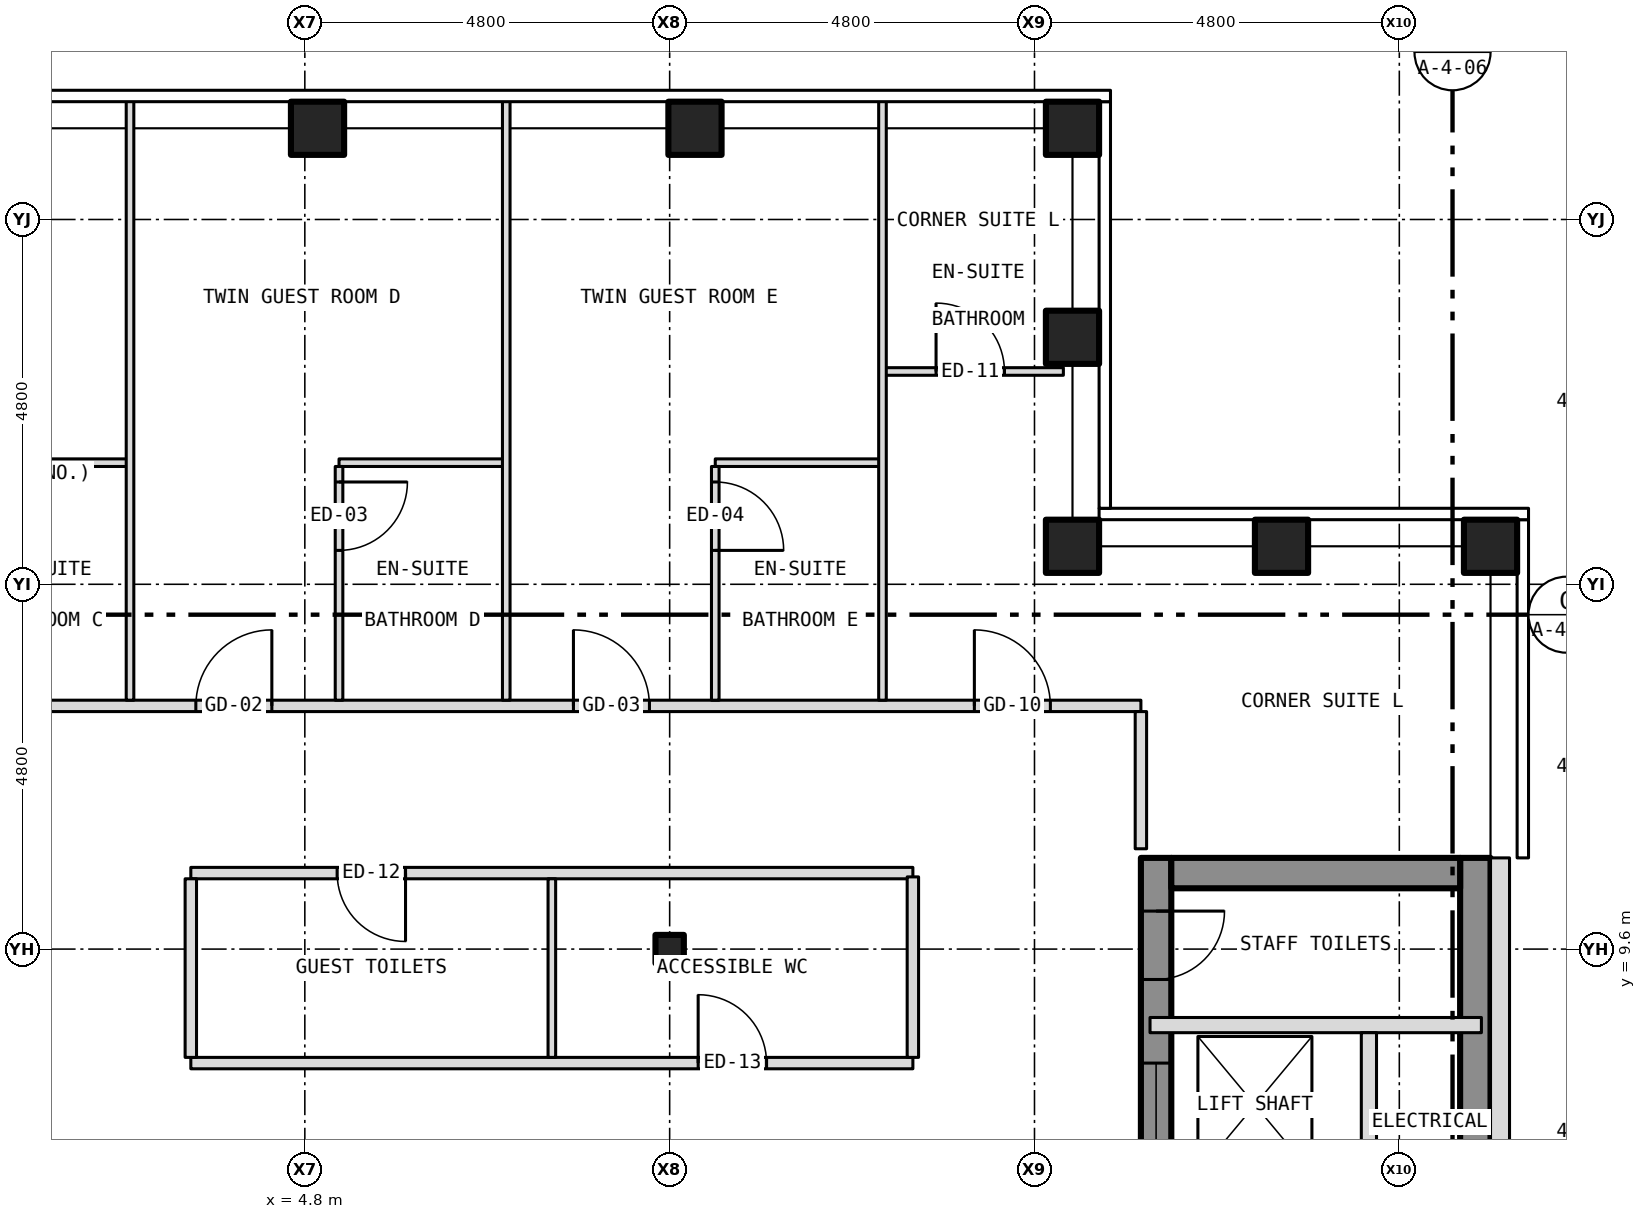
"""IFC4 building model, lengths in metres.
Left out: names, types, materials, properties, quantities, classifications, styles, units other than length and angle.
Written with IfcOpenShell. Run it as: python <this file> out.ifc"""

import sys

from ifc_helpers import new_model, si_unit, direction, frame, frame_2d, origin, origin_2d, place, context, subcontext, project, spatial, rectangle, hollow_rectangle, i_section, extrude, element, fill, save


model = new_model("IFC4")
c1 = context("Model", 3, precision=1e-05, world=origin(), true_north=direction((0.0, 1.0)))
c2 = subcontext(c1, "Body", "Model", "MODEL_VIEW")
j1 = project(units=[si_unit("LENGTHUNIT", "METRE"), si_unit("PLANEANGLEUNIT", "RADIAN")], contexts=[c1])
p1 = place(None, origin())
s1 = spatial("IfcSite", under=j1, at=p1, CompositionType="ELEMENT")
p2 = place(p1, origin())
s2 = spatial("IfcBuilding", under=s1, at=p2, CompositionType="ELEMENT")
p3 = place(p2, frame((0.0, 0.0, 215.5)))
s3 = spatial("IfcBuildingStorey", under=s2, at=p3, CompositionType="ELEMENT", Elevation=215.5)
for number, where, z_axis, x_axis in (
    (1, (4.967, 20.4, -0.15), (0.0, 0.0, 1.0), (1.0, 0.0, 0.0)),
    (2, (9.933, 20.4, -0.15), (0.0, 0.0, 1.0), (1.0, 0.0, 0.0)),
    (3, (14.9, 20.4, -0.15), (0.0, 0.0, 1.0), (1.0, 0.0, 0.0)),
    (4, (20.4, 14.9, -0.15), (0.0, 0.0, 1.0), (1.0, 0.0, 0.0)),
    (5, (14.9, 14.9, -0.15), (0.0, 0.0, 1.0), (1.0, 0.0, 0.0)),
    (6, (14.9, 17.65, -0.15), (0.0, 0.0, 1.0), (1.0, 0.0, 0.0)),
    (7, (17.65, 14.9, -0.15), (0.0, 0.0, 1.0), (1.0, 0.0, 0.0)),
):
    element("IfcColumn", number, at=place(p3, frame(where, z_axis=z_axis, x_axis=x_axis)), inside=s3, PredefinedType="COLUMN", context=c2, shape_type="SweptSolid", body=[
        extrude(hollow_rectangle(XDim=0.7, YDim=0.7, WallThickness=0.04, at=origin_2d()), origin(), (0.0, 0.0, 1.0), 3.5),
    ])
p4 = place(p3, frame((9.6, 9.6, -0.15), z_axis=(0.0, 0.0, 1.0), x_axis=(1.0, 0.0, 0.0)))
e8 = element("IfcColumn", 8, at=p4, inside=s3, PredefinedType="COLUMN", context=c2, shape_type="SweptSolid", body=[
    extrude(i_section(OverallWidth=0.373, OverallDepth=0.373, WebThickness=0.016, FlangeThickness=0.026, at=origin_2d()), origin(), (0.0, 0.0, 1.0), 3.5),
])
p5 = place(p3, frame((16.0, -10.8, 0.0), z_axis=(0.0, 0.0, 1.0), x_axis=(0.0, 1.0, 0.0)))
e9 = element("IfcWall", 9, at=p5, inside=s3, PredefinedType="SHEAR", context=c2, shape_type="SweptSolid", body=[
    extrude(rectangle(XDim=21.6, YDim=0.4, at=frame_2d((10.8, 0.0))), origin(), (0.0, 0.0, 1.0), 3.25),
])
p6 = place(p5, frame((9.4, 0.0, 0.0)))
e10 = element("IfcOpeningElement", 10, at=p6, cuts=e9, PredefinedType="OPENING", context=c2, shape_type="SweptSolid", body=[
    extrude(rectangle(XDim=1.1, YDim=2.1, at=frame_2d((0.55, 1.05))), frame((0.0, 0.212, 0.0), z_axis=(0.0, -1.0, 0.0), x_axis=(1.0, 0.0, 0.0)), (0.0, 0.0, 1.0), 0.424),
])
p7 = place(p5, frame((11.5, 0.0, 0.0)))
e11 = element("IfcOpeningElement", 11, at=p7, cuts=e9, PredefinedType="OPENING", context=c2, shape_type="SweptSolid", body=[
    extrude(rectangle(XDim=1.1, YDim=2.1, at=frame_2d((0.55, 1.05))), frame((0.0, 0.212, 0.0), z_axis=(0.0, -1.0, 0.0), x_axis=(1.0, 0.0, 0.0)), (0.0, 0.0, 1.0), 0.424),
])
p8 = place(p5, frame((13.6, 0.0, 0.0)))
e12 = element("IfcOpeningElement", 12, at=p8, cuts=e9, PredefinedType="OPENING", context=c2, shape_type="SweptSolid", body=[
    extrude(rectangle(XDim=1.1, YDim=2.1, at=frame_2d((0.55, 1.05))), frame((0.0, 0.212, 0.0), z_axis=(0.0, -1.0, 0.0), x_axis=(1.0, 0.0, 0.0)), (0.0, 0.0, 1.0), 0.424),
])
p9 = place(p5, frame((15.7, 0.0, 0.0)))
e13 = element("IfcOpeningElement", 13, at=p9, cuts=e9, PredefinedType="OPENING", context=c2, shape_type="SweptSolid", body=[
    extrude(rectangle(XDim=1.1, YDim=2.1, at=frame_2d((0.55, 1.05))), frame((0.0, 0.212, 0.0), z_axis=(0.0, -1.0, 0.0), x_axis=(1.0, 0.0, 0.0)), (0.0, 0.0, 1.0), 0.424),
])
p10 = place(p5, frame((17.8, 0.0, 0.0)))
e14 = element("IfcOpeningElement", 14, at=p10, cuts=e9, PredefinedType="OPENING", context=c2, shape_type="SweptSolid", body=[
    extrude(rectangle(XDim=1.1, YDim=2.1, at=frame_2d((0.55, 1.05))), frame((0.0, 0.212, 0.0), z_axis=(0.0, -1.0, 0.0), x_axis=(1.0, 0.0, 0.0)), (0.0, 0.0, 1.0), 0.424),
])
p11 = place(p5, frame((5.642, 0.0, 0.0)))
e15 = element("IfcOpeningElement", 15, at=p11, cuts=e9, PredefinedType="OPENING", context=c2, shape_type="SweptSolid", body=[
    extrude(rectangle(XDim=1.1, YDim=2.1, at=frame_2d((0.55, 1.05))), frame((0.0, 0.212, 0.0), z_axis=(0.0, -1.0, 0.0), x_axis=(1.0, 0.0, 0.0)), (0.0, 0.0, 1.0), 0.424),
])
p12 = place(p5, frame((7.5, 0.0, 0.0)))
e16 = element("IfcOpeningElement", 16, at=p12, cuts=e9, PredefinedType="OPENING", context=c2, shape_type="SweptSolid", body=[
    extrude(rectangle(XDim=1.1, YDim=2.1, at=frame_2d((0.55, 1.05))), frame((0.0, 0.212, 0.0), z_axis=(0.0, -1.0, 0.0), x_axis=(1.0, 0.0, 0.0)), (0.0, 0.0, 1.0), 0.424),
])
p13 = place(p5, frame((20.0, 0.0, 0.0)))
e17 = element("IfcOpeningElement", 17, at=p13, cuts=e9, PredefinedType="OPENING", context=c2, shape_type="SweptSolid", body=[
    extrude(rectangle(XDim=0.9, YDim=2.1, at=frame_2d((0.45, 1.05))), frame((0.0, 0.212, 0.0), z_axis=(0.0, -1.0, 0.0), x_axis=(1.0, 0.0, 0.0)), (0.0, 0.0, 1.0), 0.424),
])
p14 = place(p3, frame((20.2, -10.8, 0.0), z_axis=(0.0, 0.0, 1.0), x_axis=(0.0, 1.0, 0.0)))
e18 = element("IfcWall", 18, at=p14, inside=s3, PredefinedType="SHEAR", context=c2, shape_type="SweptSolid", body=[
    extrude(rectangle(XDim=21.6, YDim=0.4, at=frame_2d((10.8, 0.0))), origin(), (0.0, 0.0, 1.0), 3.25),
])
p15 = place(p3, frame((16.2, 10.6, 0.0), z_axis=(0.0, 0.0, 1.0), x_axis=(1.0, 0.0, 0.0)))
e19 = element("IfcWall", 19, at=p15, inside=s3, PredefinedType="SHEAR", context=c2, shape_type="SweptSolid", body=[
    extrude(rectangle(XDim=3.8, YDim=0.4, at=frame_2d((1.9, 0.0))), origin(), (0.0, 0.0, 1.0), 3.25),
])
p16 = place(p3, frame((20.525, -10.8, 0.0), z_axis=(0.0, 0.0, 1.0), x_axis=(0.0, 1.0, 0.0)))
e20 = element("IfcWall", 20, at=p16, inside=s3, PredefinedType="SOLIDWALL", context=c2, shape_type="SweptSolid", body=[
    extrude(rectangle(XDim=21.6, YDim=0.25, at=frame_2d((10.8, 0.0))), origin(), (0.0, 0.0, 1.0), 3.5),
])
p17 = place(p16, frame((2.95, 0.0, 1.0)))
e21 = element("IfcOpeningElement", 21, at=p17, cuts=e20, PredefinedType="OPENING", context=c2, shape_type="SweptSolid", body=[
    extrude(rectangle(XDim=0.6, YDim=1.5, at=frame_2d((0.3, 0.75))), frame((0.0, 0.137, 0.0), z_axis=(0.0, -1.0, 0.0), x_axis=(1.0, 0.0, 0.0)), (0.0, 0.0, 1.0), 0.274),
])
p18 = place(p3, frame((3.3, 8.1, 0.0), z_axis=(0.0, 0.0, 1.0), x_axis=(1.0, 0.0, 0.0)))
e22 = element("IfcWall", 22, at=p18, inside=s3, PredefinedType="PARTITIONING", context=c2, shape_type="SweptSolid", body=[
    extrude(rectangle(XDim=9.5, YDim=0.15, at=frame_2d((4.75, 0.0))), origin(), (0.0, 0.0, 1.0), 3.35),
])
p19 = place(p18, frame((6.675, 0.0, 0.0)))
e23 = element("IfcOpeningElement", 23, at=p19, cuts=e22, PredefinedType="OPENING", context=c2, shape_type="SweptSolid", body=[
    extrude(rectangle(XDim=0.9, YDim=2.1, at=frame_2d((0.45, 1.05))), frame((0.0, 0.087, 0.0), z_axis=(0.0, -1.0, 0.0), x_axis=(1.0, 0.0, 0.0)), (0.0, 0.0, 1.0), 0.174),
])
p20 = place(p3, frame((15.92, 8.6, 0.0), z_axis=(0.0, 0.0, 1.0), x_axis=(1.0, 0.0, 0.0)))
e24 = element("IfcWall", 24, at=p20, inside=s3, PredefinedType="PARTITIONING", context=c2, shape_type="SweptSolid", body=[
    extrude(rectangle(XDim=4.36, YDim=0.2, at=frame_2d((2.18, 0.0))), origin(), (0.0, 0.0, 1.0), 3.25),
])
p21 = place(p3, frame((3.3, 10.6, 0.0), z_axis=(0.0, 0.0, 1.0), x_axis=(1.0, 0.0, 0.0)))
e25 = element("IfcWall", 25, at=p21, inside=s3, PredefinedType="PARTITIONING", context=c2, shape_type="SweptSolid", body=[
    extrude(rectangle(XDim=9.5, YDim=0.15, at=frame_2d((4.75, 0.0))), origin(), (0.0, 0.0, 1.0), 3.35),
])
p22 = place(p21, frame((1.925, 0.0, 0.0)))
e26 = element("IfcOpeningElement", 26, at=p22, cuts=e25, PredefinedType="OPENING", context=c2, shape_type="SweptSolid", body=[
    extrude(rectangle(XDim=0.9, YDim=2.1, at=frame_2d((0.45, 1.05))), frame((0.0, 0.087, 0.0), z_axis=(0.0, -1.0, 0.0), x_axis=(1.0, 0.0, 0.0)), (0.0, 0.0, 1.0), 0.174),
])
p23 = place(p3, frame((-15.8, 12.8, 0.0), z_axis=(0.0, 0.0, 1.0), x_axis=(1.0, 0.0, 0.0)))
e27 = element("IfcWall", 27, at=p23, inside=s3, PredefinedType="PARTITIONING", context=c2, shape_type="SweptSolid", body=[
    extrude(rectangle(XDim=31.6, YDim=0.15, at=frame_2d((15.8, 0.0))), origin(), (0.0, 0.0, 1.0), 3.35),
])
p24 = place(p23, frame((5.417, 0.0, 0.0)))
e28 = element("IfcOpeningElement", 28, at=p24, cuts=e27, PredefinedType="OPENING", context=c2, shape_type="SweptSolid", body=[
    extrude(rectangle(XDim=0.9, YDim=2.1, at=frame_2d((0.45, 1.05))), frame((0.0, 0.087, 0.0), z_axis=(0.0, -1.0, 0.0), x_axis=(1.0, 0.0, 0.0)), (0.0, 0.0, 1.0), 0.174),
])
p25 = place(p23, frame((10.384, 0.0, 0.0)))
e29 = element("IfcOpeningElement", 29, at=p25, cuts=e27, PredefinedType="OPENING", context=c2, shape_type="SweptSolid", body=[
    extrude(rectangle(XDim=0.9, YDim=2.1, at=frame_2d((0.45, 1.05))), frame((0.0, 0.087, 0.0), z_axis=(0.0, -1.0, 0.0), x_axis=(1.0, 0.0, 0.0)), (0.0, 0.0, 1.0), 0.174),
])
p26 = place(p23, frame((14.2, 0.0, 0.0)))
e30 = element("IfcOpeningElement", 30, at=p26, cuts=e27, PredefinedType="OPENING", context=c2, shape_type="SweptSolid", body=[
    extrude(rectangle(XDim=1.0, YDim=2.1, at=frame_2d((0.5, 1.05))), frame((0.0, 0.087, 0.0), z_axis=(0.0, -1.0, 0.0), x_axis=(1.0, 0.0, 0.0)), (0.0, 0.0, 1.0), 0.174),
])
p27 = place(p23, frame((19.166, 0.0, 0.0)))
e31 = element("IfcOpeningElement", 31, at=p27, cuts=e27, PredefinedType="OPENING", context=c2, shape_type="SweptSolid", body=[
    extrude(rectangle(XDim=1.0, YDim=2.1, at=frame_2d((0.5, 1.05))), frame((0.0, 0.087, 0.0), z_axis=(0.0, -1.0, 0.0), x_axis=(1.0, 0.0, 0.0)), (0.0, 0.0, 1.0), 0.174),
])
p28 = place(p23, frame((24.134, 0.0, 0.0)))
e32 = element("IfcOpeningElement", 32, at=p28, cuts=e27, PredefinedType="OPENING", context=c2, shape_type="SweptSolid", body=[
    extrude(rectangle(XDim=1.0, YDim=2.1, at=frame_2d((0.5, 1.05))), frame((0.0, 0.087, 0.0), z_axis=(0.0, -1.0, 0.0), x_axis=(1.0, 0.0, 0.0)), (0.0, 0.0, 1.0), 0.174),
])
p29 = place(p23, frame((1.192, 0.0, 0.0)))
e33 = element("IfcOpeningElement", 33, at=p29, cuts=e27, PredefinedType="OPENING", context=c2, shape_type="SweptSolid", body=[
    extrude(rectangle(XDim=1.0, YDim=2.1, at=frame_2d((0.5, 1.05))), frame((0.0, 0.087, 0.0), z_axis=(0.0, -1.0, 0.0), x_axis=(1.0, 0.0, 0.0)), (0.0, 0.0, 1.0), 0.174),
])
p30 = place(p23, frame((29.409, 0.0, 0.0)))
e34 = element("IfcOpeningElement", 34, at=p30, cuts=e27, PredefinedType="OPENING", context=c2, shape_type="SweptSolid", body=[
    extrude(rectangle(XDim=1.0, YDim=2.1, at=frame_2d((0.5, 1.05))), frame((0.0, 0.087, 0.0), z_axis=(0.0, -1.0, 0.0), x_axis=(1.0, 0.0, 0.0)), (0.0, 0.0, 1.0), 0.174),
])
for number, where, z_axis, x_axis in (
    (35, (0.3, 16.0, 0.0), (0.0, 0.0, 1.0), (1.0, 0.0, 0.0)),
    (36, (5.25, 16.0, 0.0), (0.0, 0.0, 1.0), (1.0, 0.0, 0.0)),
    (37, (10.2, 16.0, 0.0), (0.0, 0.0, 1.0), (1.0, 0.0, 0.0)),
):
    element("IfcWall", number, at=place(p3, frame(where, z_axis=z_axis, x_axis=x_axis)), inside=s3, PredefinedType="PARTITIONING", context=c2, shape_type="SweptSolid", body=[
        extrude(rectangle(XDim=2.2, YDim=0.1, at=frame_2d((1.1, 0.0))), origin(), (0.0, 0.0, 1.0), 3.35),
    ])
p31 = place(p3, frame((12.4, 17.2, 0.0), z_axis=(0.0, 0.0, 1.0), x_axis=(1.0, 0.0, 0.0)))
e38 = element("IfcWall", 38, at=p31, inside=s3, PredefinedType="PARTITIONING", context=c2, shape_type="SweptSolid", body=[
    extrude(rectangle(XDim=2.38, YDim=0.1, at=frame_2d((1.19, 0.0))), origin(), (0.0, 0.0, 1.0), 3.35),
])
p32 = place(p31, frame((0.705, 0.0, 0.0)))
e39 = element("IfcOpeningElement", 39, at=p32, cuts=e38, PredefinedType="OPENING", context=c2, shape_type="SweptSolid", body=[
    extrude(rectangle(XDim=0.9, YDim=2.1, at=frame_2d((0.45, 1.05))), frame((0.0, 0.062, 0.0), z_axis=(0.0, -1.0, 0.0), x_axis=(1.0, 0.0, 0.0)), (0.0, 0.0, 1.0), 0.124),
])
p33 = place(p3, frame((2.5, 12.875, 0.0), z_axis=(0.0, 0.0, 1.0), x_axis=(0.0, 1.0, 0.0)))
e40 = element("IfcWall", 40, at=p33, inside=s3, PredefinedType="PARTITIONING", context=c2, shape_type="SweptSolid", body=[
    extrude(rectangle(XDim=7.905, YDim=0.1, at=frame_2d((3.953, 0.0))), origin(), (0.0, 0.0, 1.0), 3.35),
])
p34 = place(p3, frame((3.3, 8.175, 0.0), z_axis=(0.0, 0.0, 1.0), x_axis=(0.0, 1.0, 0.0)))
e41 = element("IfcWall", 41, at=p34, inside=s3, PredefinedType="PARTITIONING", context=c2, shape_type="SweptSolid", body=[
    extrude(rectangle(XDim=2.35, YDim=0.15, at=frame_2d((1.175, 0.0))), origin(), (0.0, 0.0, 1.0), 3.35),
])
p35 = place(p3, frame((5.25, 12.875, 0.0), z_axis=(0.0, 0.0, 1.0), x_axis=(0.0, 1.0, 0.0)))
e42 = element("IfcWall", 42, at=p35, inside=s3, PredefinedType="PARTITIONING", context=c2, shape_type="SweptSolid", body=[
    extrude(rectangle(XDim=3.075, YDim=0.1, at=frame_2d((1.538, 0.0))), origin(), (0.0, 0.0, 1.0), 3.35),
])
p36 = place(p35, frame((1.971, 0.0, 0.0)))
e43 = element("IfcOpeningElement", 43, at=p36, cuts=e42, PredefinedType="OPENING", context=c2, shape_type="SweptSolid", body=[
    extrude(rectangle(XDim=0.9, YDim=2.1, at=frame_2d((0.45, 1.05))), frame((0.0, 0.062, 0.0), z_axis=(0.0, -1.0, 0.0), x_axis=(1.0, 0.0, 0.0)), (0.0, 0.0, 1.0), 0.124),
])
p37 = place(p3, frame((7.45, 12.875, 0.0), z_axis=(0.0, 0.0, 1.0), x_axis=(0.0, 1.0, 0.0)))
e44 = element("IfcWall", 44, at=p37, inside=s3, PredefinedType="PARTITIONING", context=c2, shape_type="SweptSolid", body=[
    extrude(rectangle(XDim=7.905, YDim=0.1, at=frame_2d((3.953, 0.0))), origin(), (0.0, 0.0, 1.0), 3.35),
])
p38 = place(p3, frame((8.05, 8.175, 0.0), z_axis=(0.0, 0.0, 1.0), x_axis=(0.0, 1.0, 0.0)))
e45 = element("IfcWall", 45, at=p38, inside=s3, PredefinedType="PARTITIONING", context=c2, shape_type="SweptSolid", body=[
    extrude(rectangle(XDim=2.35, YDim=0.1, at=frame_2d((1.175, 0.0))), origin(), (0.0, 0.0, 1.0), 3.35),
])
p39 = place(p3, frame((10.2, 12.875, 0.0), z_axis=(0.0, 0.0, 1.0), x_axis=(0.0, 1.0, 0.0)))
e46 = element("IfcWall", 46, at=p39, inside=s3, PredefinedType="PARTITIONING", context=c2, shape_type="SweptSolid", body=[
    extrude(rectangle(XDim=3.075, YDim=0.1, at=frame_2d((1.538, 0.0))), origin(), (0.0, 0.0, 1.0), 3.35),
])
p40 = place(p39, frame((1.971, 0.0, 0.0)))
e47 = element("IfcOpeningElement", 47, at=p40, cuts=e46, PredefinedType="OPENING", context=c2, shape_type="SweptSolid", body=[
    extrude(rectangle(XDim=0.9, YDim=2.1, at=frame_2d((0.45, 1.05))), frame((0.0, 0.062, 0.0), z_axis=(0.0, -1.0, 0.0), x_axis=(1.0, 0.0, 0.0)), (0.0, 0.0, 1.0), 0.124),
])
p41 = place(p3, frame((12.4, 12.875, 0.0), z_axis=(0.0, 0.0, 1.0), x_axis=(0.0, 1.0, 0.0)))
e48 = element("IfcWall", 48, at=p41, inside=s3, PredefinedType="PARTITIONING", context=c2, shape_type="SweptSolid", body=[
    extrude(rectangle(XDim=7.905, YDim=0.1, at=frame_2d((3.953, 0.0))), origin(), (0.0, 0.0, 1.0), 3.35),
])
p42 = place(p3, frame((12.8, 8.175, 0.0), z_axis=(0.0, 0.0, 1.0), x_axis=(0.0, 1.0, 0.0)))
e49 = element("IfcWall", 49, at=p42, inside=s3, PredefinedType="PARTITIONING", context=c2, shape_type="SweptSolid", body=[
    extrude(rectangle(XDim=2.375, YDim=0.15, at=frame_2d((1.188, 0.0))), origin(), (0.0, 0.0, 1.0), 3.35),
])
p43 = place(p3, frame((15.8, 10.92, 0.0), z_axis=(0.0, 0.0, 1.0), x_axis=(0.0, 1.0, 0.0)))
e50 = element("IfcWall", 50, at=p43, inside=s3, PredefinedType="PARTITIONING", context=c2, shape_type="SweptSolid", body=[
    extrude(rectangle(XDim=1.805, YDim=0.15, at=frame_2d((0.903, 0.0))), origin(), (0.0, 0.0, 1.0), 3.35),
])
p44 = place(p3, frame((18.8, -1.8, 0.0), z_axis=(0.0, 0.0, 1.0), x_axis=(0.0, 1.0, 0.0)))
e51 = element("IfcWall", 51, at=p44, inside=s3, PredefinedType="PARTITIONING", context=c2, shape_type="SweptSolid", body=[
    extrude(rectangle(XDim=10.3, YDim=0.2, at=frame_2d((5.15, 0.0))), origin(), (0.0, 0.0, 1.0), 3.25),
])
p45 = place(p10, origin())
e52 = element("IfcDoor", 52, at=p45, inside=s3, OperationType="SLIDING_TO_LEFT", PredefinedType="DOOR", context=c2, shape_type="SweptSolid", body=[
    extrude(rectangle(XDim=1.1, YDim=2.1, at=frame_2d((0.55, 1.05))), frame((0.0, 0.025, 0.0), z_axis=(0.0, -1.0, 0.0), x_axis=(1.0, 0.0, 0.0)), (0.0, 0.0, 1.0), 0.05),
])
fill(e14, e52)
p46 = place(p13, origin())
e53 = element("IfcDoor", 53, at=p46, inside=s3, OperationType="SINGLE_SWING_RIGHT", PredefinedType="DOOR", context=c2, shape_type="SweptSolid", body=[
    extrude(rectangle(XDim=0.9, YDim=2.1, at=frame_2d((0.45, 1.05))), frame((0.0, 0.025, 0.0), z_axis=(0.0, -1.0, 0.0), x_axis=(1.0, 0.0, 0.0)), (0.0, 0.0, 1.0), 0.05),
])
fill(e17, e53)
p47 = place(p27, origin())
e54 = element("IfcDoor", 54, at=p47, inside=s3, OperationType="SINGLE_SWING_RIGHT", PredefinedType="DOOR", context=c2, shape_type="SweptSolid", body=[
    extrude(rectangle(XDim=1.0, YDim=2.1, at=frame_2d((0.5, 1.05))), frame((0.0, 0.025, 0.0), z_axis=(0.0, -1.0, 0.0), x_axis=(1.0, 0.0, 0.0)), (0.0, 0.0, 1.0), 0.05),
])
fill(e31, e54)
p48 = place(p36, origin())
e55 = element("IfcDoor", 55, at=p48, inside=s3, OperationType="SINGLE_SWING_RIGHT", PredefinedType="DOOR", context=c2, shape_type="SweptSolid", body=[
    extrude(rectangle(XDim=0.9, YDim=2.1, at=frame_2d((0.45, 1.05))), frame((0.0, 0.025, 0.0), z_axis=(0.0, -1.0, 0.0), x_axis=(1.0, 0.0, 0.0)), (0.0, 0.0, 1.0), 0.05),
])
fill(e43, e55)
p49 = place(p28, origin())
e56 = element("IfcDoor", 56, at=p49, inside=s3, OperationType="SINGLE_SWING_LEFT", PredefinedType="DOOR", context=c2, shape_type="SweptSolid", body=[
    extrude(rectangle(XDim=1.0, YDim=2.1, at=frame_2d((0.5, 1.05))), frame((0.0, 0.025, 0.0), z_axis=(0.0, -1.0, 0.0), x_axis=(1.0, 0.0, 0.0)), (0.0, 0.0, 1.0), 0.05),
])
fill(e32, e56)
p50 = place(p40, origin())
e57 = element("IfcDoor", 57, at=p50, inside=s3, OperationType="SINGLE_SWING_LEFT", PredefinedType="DOOR", context=c2, shape_type="SweptSolid", body=[
    extrude(rectangle(XDim=0.9, YDim=2.1, at=frame_2d((0.45, 1.05))), frame((0.0, 0.025, 0.0), z_axis=(0.0, -1.0, 0.0), x_axis=(1.0, 0.0, 0.0)), (0.0, 0.0, 1.0), 0.05),
])
fill(e47, e57)
p51 = place(p32, origin())
e58 = element("IfcDoor", 58, at=p51, inside=s3, OperationType="SINGLE_SWING_LEFT", PredefinedType="DOOR", context=c2, shape_type="SweptSolid", body=[
    extrude(rectangle(XDim=0.9, YDim=2.1, at=frame_2d((0.45, 1.05))), frame((0.0, 0.025, 0.0), z_axis=(0.0, -1.0, 0.0), x_axis=(1.0, 0.0, 0.0)), (0.0, 0.0, 1.0), 0.05),
])
fill(e39, e58)
p52 = place(p30, origin())
e59 = element("IfcDoor", 59, at=p52, inside=s3, OperationType="SINGLE_SWING_LEFT", PredefinedType="DOOR", context=c2, shape_type="SweptSolid", body=[
    extrude(rectangle(XDim=1.0, YDim=2.1, at=frame_2d((0.5, 1.05))), frame((0.0, 0.025, 0.0), z_axis=(0.0, -1.0, 0.0), x_axis=(1.0, 0.0, 0.0)), (0.0, 0.0, 1.0), 0.05),
])
fill(e34, e59)
p53 = place(p22, origin())
e60 = element("IfcDoor", 60, at=p53, inside=s3, OperationType="SINGLE_SWING_RIGHT", PredefinedType="DOOR", context=c2, shape_type="SweptSolid", body=[
    extrude(rectangle(XDim=0.9, YDim=2.1, at=frame_2d((0.45, 1.05))), frame((0.0, 0.025, 0.0), z_axis=(0.0, -1.0, 0.0), x_axis=(1.0, 0.0, 0.0)), (0.0, 0.0, 1.0), 0.05),
])
fill(e26, e60)
p54 = place(p19, origin())
e61 = element("IfcDoor", 61, at=p54, inside=s3, OperationType="SINGLE_SWING_LEFT", PredefinedType="DOOR", context=c2, shape_type="SweptSolid", body=[
    extrude(rectangle(XDim=0.9, YDim=2.1, at=frame_2d((0.45, 1.05))), frame((0.0, 0.025, 0.0), z_axis=(0.0, -1.0, 0.0), x_axis=(1.0, 0.0, 0.0)), (0.0, 0.0, 1.0), 0.05),
])
fill(e23, e61)
save(model, sys.argv[1])
